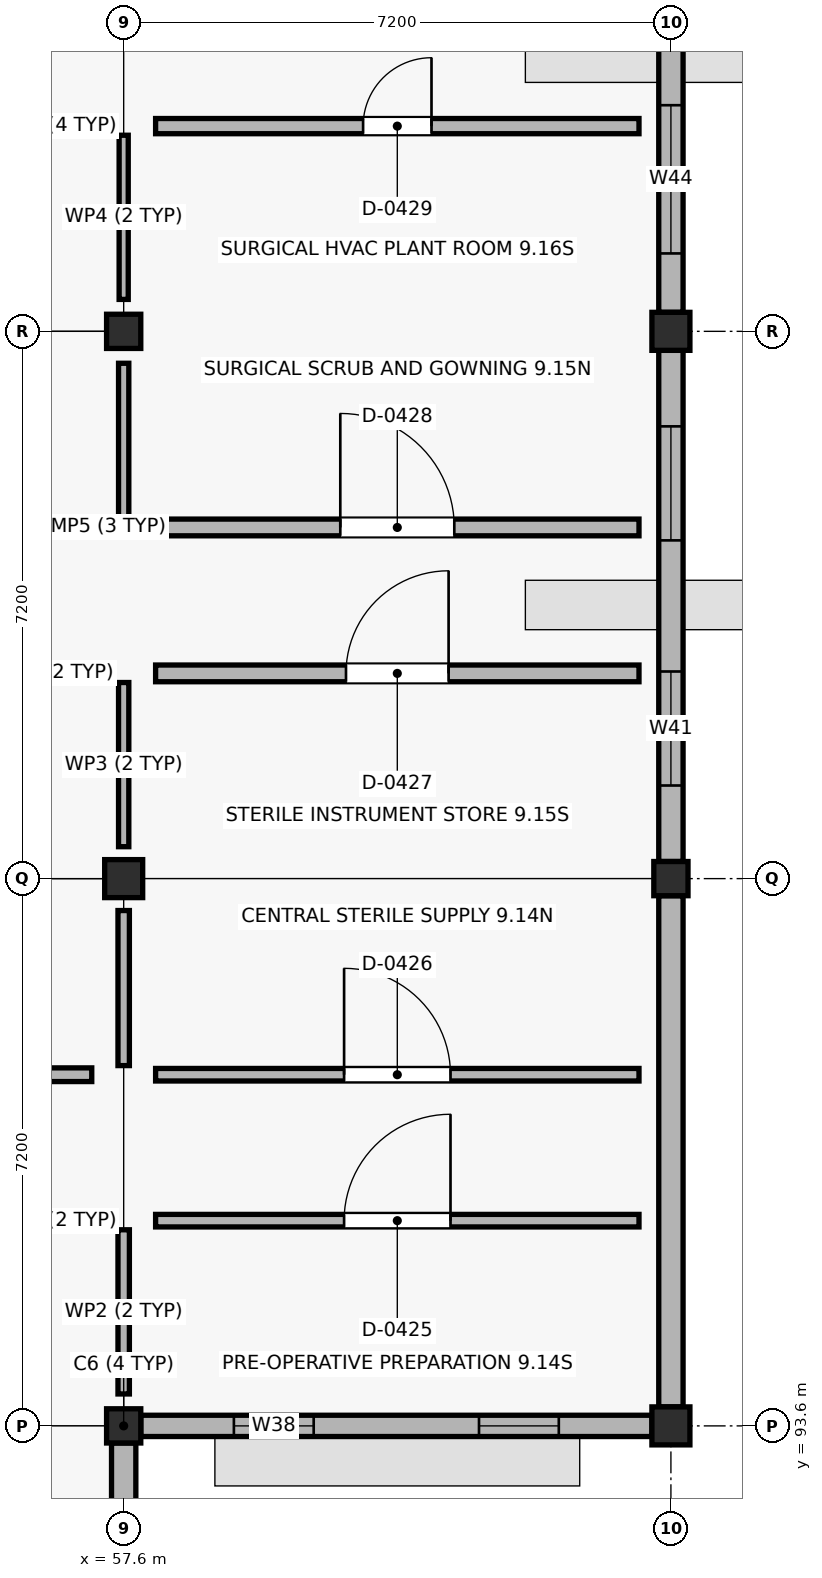
"""IFC4 building model, lengths in metres.
Left out: names, types, materials, properties, quantities, classifications, styles, units other than length and angle.
Written with IfcOpenShell. Run it as: python <this file> out.ifc"""

import sys

from ifc_helpers import new_model, si_unit, direction, frame, frame_2d, origin, origin_2d, place, context, subcontext, project, spatial, rectangle, extrude, element, fill, save


model = new_model("IFC4")
c1 = context("Model", 3, precision=1e-05, world=origin(), true_north=direction((0.0, 1.0)))
c2 = subcontext(c1, "Body", "Model", "MODEL_VIEW")
j1 = project(units=[si_unit("LENGTHUNIT", "METRE"), si_unit("PLANEANGLEUNIT", "RADIAN")], contexts=[c1])
p1 = place(None, origin())
s1 = spatial("IfcSite", under=j1, at=p1, CompositionType="ELEMENT")
p2 = place(p1, origin())
s2 = spatial("IfcBuilding", under=s1, at=p2, CompositionType="ELEMENT")
p3 = place(p2, frame((0.0, 0.0, 9.0)))
s3 = spatial("IfcBuildingStorey", under=s2, at=p3, CompositionType="ELEMENT", Elevation=9.0)
p4 = place(p3, frame((57.6, 93.6, 0.0), z_axis=(0.0, 0.0, 1.0), x_axis=(1.0, 0.0, 0.0)))
e1 = element("IfcColumn", 1, at=p4, inside=s3, PredefinedType="COLUMN", context=c2, shape_type="SweptSolid", body=[
    extrude(rectangle(XDim=0.45, YDim=0.45, at=origin_2d()), origin(), (0.0, 0.0, 1.0), 4.28),
])
p5 = place(p3, frame((57.6, 100.8, 0.0), z_axis=(0.0, 0.0, 1.0), x_axis=(1.0, 0.0, 0.0)))
e2 = element("IfcColumn", 2, at=p5, inside=s3, PredefinedType="COLUMN", context=c2, shape_type="SweptSolid", body=[
    extrude(rectangle(XDim=0.5, YDim=0.5, at=origin_2d()), origin(), (0.0, 0.0, 1.0), 4.28),
])
p6 = place(p3, frame((57.6, 108.0, 0.0), z_axis=(0.0, 0.0, 1.0), x_axis=(1.0, 0.0, 0.0)))
e3 = element("IfcColumn", 3, at=p6, inside=s3, PredefinedType="COLUMN", context=c2, shape_type="SweptSolid", body=[
    extrude(rectangle(XDim=0.45, YDim=0.45, at=origin_2d()), origin(), (0.0, 0.0, 1.0), 4.28),
])
p7 = place(p3, frame((64.8, 93.6, 0.0), z_axis=(0.0, 0.0, 1.0), x_axis=(1.0, 0.0, 0.0)))
e4 = element("IfcColumn", 4, at=p7, inside=s3, PredefinedType="COLUMN", context=c2, shape_type="SweptSolid", body=[
    extrude(rectangle(XDim=0.5, YDim=0.5, at=origin_2d()), origin(), (0.0, 0.0, 1.0), 4.28),
])
p8 = place(p3, frame((64.8, 100.8, 0.0), z_axis=(0.0, 0.0, 1.0), x_axis=(1.0, 0.0, 0.0)))
e5 = element("IfcColumn", 5, at=p8, inside=s3, PredefinedType="COLUMN", context=c2, shape_type="SweptSolid", body=[
    extrude(rectangle(XDim=0.45, YDim=0.45, at=origin_2d()), origin(), (0.0, 0.0, 1.0), 4.28),
])
p9 = place(p3, frame((64.8, 108.0, 0.0), z_axis=(0.0, 0.0, 1.0), x_axis=(1.0, 0.0, 0.0)))
e6 = element("IfcColumn", 6, at=p9, inside=s3, PredefinedType="COLUMN", context=c2, shape_type="SweptSolid", body=[
    extrude(rectangle(XDim=0.5, YDim=0.5, at=origin_2d()), origin(), (0.0, 0.0, 1.0), 4.28),
])
p10 = place(p3, frame((57.6, 86.65, 0.0), z_axis=(0.0, 0.0, 1.0), x_axis=(0.0, 1.0, 0.0)))
e7 = element("IfcWall", 7, at=p10, inside=s3, PredefinedType="STANDARD", context=c2, shape_type="SweptSolid", body=[
    extrude(rectangle(XDim=6.725, YDim=0.32, at=frame_2d((3.363, 0.0))), origin(), (0.0, 0.0, 1.0), 3.69),
])
p11 = place(p10, frame((1.15, 0.0, 0.9)))
e8 = element("IfcOpeningElement", 8, at=p11, cuts=e7, PredefinedType="OPENING", context=c2, shape_type="SweptSolid", body=[
    extrude(rectangle(XDim=1.2, YDim=1.62, at=frame_2d((0.6, 0.81))), frame((0.0, 0.17, 0.0), z_axis=(0.0, -1.0, 0.0), x_axis=(1.0, 0.0, 0.0)), (0.0, 0.0, 1.0), 0.34),
])
p12 = place(p10, frame((4.375, 0.0, 0.9)))
e9 = element("IfcOpeningElement", 9, at=p12, cuts=e7, PredefinedType="OPENING", context=c2, shape_type="SweptSolid", body=[
    extrude(rectangle(XDim=1.2, YDim=1.62, at=frame_2d((0.6, 0.81))), frame((0.0, 0.17, 0.0), z_axis=(0.0, -1.0, 0.0), x_axis=(1.0, 0.0, 0.0)), (0.0, 0.0, 1.0), 0.34),
])
p13 = place(p3, frame((57.825, 93.6, 0.0), z_axis=(0.0, 0.0, 1.0), x_axis=(1.0, 0.0, 0.0)))
e10 = element("IfcWall", 10, at=p13, inside=s3, PredefinedType="STANDARD", context=c2, shape_type="SweptSolid", body=[
    extrude(rectangle(XDim=6.725, YDim=0.28, at=frame_2d((3.363, 0.0))), origin(), (0.0, 0.0, 1.0), 3.59),
])
p14 = place(p13, frame((1.225, 0.0, 0.9)))
e11 = element("IfcOpeningElement", 11, at=p14, cuts=e10, PredefinedType="OPENING", context=c2, shape_type="SweptSolid", body=[
    extrude(rectangle(XDim=1.05, YDim=1.75, at=frame_2d((0.525, 0.875))), frame((0.0, 0.15, 0.0), z_axis=(0.0, -1.0, 0.0), x_axis=(1.0, 0.0, 0.0)), (0.0, 0.0, 1.0), 0.3),
])
p15 = place(p13, frame((4.45, 0.0, 0.9)))
e12 = element("IfcOpeningElement", 12, at=p15, cuts=e10, PredefinedType="OPENING", context=c2, shape_type="SweptSolid", body=[
    extrude(rectangle(XDim=1.05, YDim=1.75, at=frame_2d((0.525, 0.875))), frame((0.0, 0.15, 0.0), z_axis=(0.0, -1.0, 0.0), x_axis=(1.0, 0.0, 0.0)), (0.0, 0.0, 1.0), 0.3),
])
p16 = place(p3, frame((64.8, 93.85, 0.0), z_axis=(0.0, 0.0, 1.0), x_axis=(0.0, 1.0, 0.0)))
e13 = element("IfcWall", 13, at=p16, inside=s3, PredefinedType="STANDARD", context=c2, shape_type="SweptSolid", body=[
    extrude(rectangle(XDim=6.725, YDim=0.32, at=frame_2d((3.362, 0.0))), origin(), (0.0, 0.0, 1.0), 3.69),
])
p17 = place(p3, frame((64.8, 101.025, 0.0), z_axis=(0.0, 0.0, 1.0), x_axis=(0.0, 1.0, 0.0)))
e14 = element("IfcWall", 14, at=p17, inside=s3, PredefinedType="STANDARD", context=c2, shape_type="SweptSolid", body=[
    extrude(rectangle(XDim=6.725, YDim=0.32, at=frame_2d((3.363, 0.0))), origin(), (0.0, 0.0, 1.0), 3.69),
])
p18 = place(p17, frame((1.0, 0.0, 0.9)))
e15 = element("IfcOpeningElement", 15, at=p18, cuts=e14, PredefinedType="OPENING", context=c2, shape_type="SweptSolid", body=[
    extrude(rectangle(XDim=1.5, YDim=1.75, at=frame_2d((0.75, 0.875))), frame((0.0, 0.17, 0.0), z_axis=(0.0, -1.0, 0.0), x_axis=(1.0, 0.0, 0.0)), (0.0, 0.0, 1.0), 0.34),
])
p19 = place(p17, frame((4.225, 0.0, 0.9)))
e16 = element("IfcOpeningElement", 16, at=p19, cuts=e14, PredefinedType="OPENING", context=c2, shape_type="SweptSolid", body=[
    extrude(rectangle(XDim=1.5, YDim=1.75, at=frame_2d((0.75, 0.875))), frame((0.0, 0.17, 0.0), z_axis=(0.0, -1.0, 0.0), x_axis=(1.0, 0.0, 0.0)), (0.0, 0.0, 1.0), 0.34),
])
p20 = place(p3, frame((64.8, 108.25, 0.0), z_axis=(0.0, 0.0, 1.0), x_axis=(0.0, 1.0, 0.0)))
e17 = element("IfcWall", 17, at=p20, inside=s3, PredefinedType="STANDARD", context=c2, shape_type="SweptSolid", body=[
    extrude(rectangle(XDim=6.725, YDim=0.32, at=frame_2d((3.363, 0.0))), origin(), (0.0, 0.0, 1.0), 3.69),
])
p21 = place(p20, frame((0.775, 0.0, 0.9)))
e18 = element("IfcOpeningElement", 18, at=p21, cuts=e17, PredefinedType="OPENING", context=c2, shape_type="SweptSolid", body=[
    extrude(rectangle(XDim=1.95, YDim=1.75, at=frame_2d((0.975, 0.875))), frame((0.0, 0.17, 0.0), z_axis=(0.0, -1.0, 0.0), x_axis=(1.0, 0.0, 0.0)), (0.0, 0.0, 1.0), 0.34),
])
p22 = place(p20, frame((4.0, 0.0, 0.9)))
e19 = element("IfcOpeningElement", 19, at=p22, cuts=e17, PredefinedType="OPENING", context=c2, shape_type="SweptSolid", body=[
    extrude(rectangle(XDim=1.95, YDim=1.75, at=frame_2d((0.975, 0.875))), frame((0.0, 0.17, 0.0), z_axis=(0.0, -1.0, 0.0), x_axis=(1.0, 0.0, 0.0)), (0.0, 0.0, 1.0), 0.34),
])
p23 = place(p3, frame((50.82, 96.3, 0.0), z_axis=(0.0, 0.0, 1.0), x_axis=(1.0, 0.0, 0.0)))
e20 = element("IfcWall", 20, at=p23, inside=s3, PredefinedType="PARTITIONING", context=c2, shape_type="SweptSolid", body=[
    extrude(rectangle(XDim=6.36, YDim=0.18, at=frame_2d((3.18, 0.0))), origin(), (0.0, 0.0, 1.0), 3.38),
])
p24 = place(p23, frame((2.43, 0.0, 0.0)))
e21 = element("IfcOpeningElement", 21, at=p24, cuts=e20, PredefinedType="OPENING", context=c2, shape_type="SweptSolid", body=[
    extrude(rectangle(XDim=1.5, YDim=2.2, at=frame_2d((0.75, 1.1))), frame((0.0, 0.1, 0.0), z_axis=(0.0, -1.0, 0.0), x_axis=(1.0, 0.0, 0.0)), (0.0, 0.0, 1.0), 0.2),
])
p25 = place(p3, frame((57.6, 94.02, 0.0), z_axis=(0.0, 0.0, 1.0), x_axis=(0.0, 1.0, 0.0)))
e22 = element("IfcWall", 22, at=p25, inside=s3, PredefinedType="PARTITIONING", context=c2, shape_type="SweptSolid", body=[
    extrude(rectangle(XDim=2.16, YDim=0.15, at=frame_2d((1.08, 0.0))), origin(), (0.0, 0.0, 1.0), 3.38),
])
p26 = place(p3, frame((50.82, 98.22, 0.0), z_axis=(0.0, 0.0, 1.0), x_axis=(1.0, 0.0, 0.0)))
e23 = element("IfcWall", 23, at=p26, inside=s3, PredefinedType="PARTITIONING", context=c2, shape_type="SweptSolid", body=[
    extrude(rectangle(XDim=6.36, YDim=0.18, at=frame_2d((3.18, 0.0))), origin(), (0.0, 0.0, 1.0), 3.38),
])
p27 = place(p26, frame((2.49, 0.0, 0.0)))
e24 = element("IfcOpeningElement", 24, at=p27, cuts=e23, PredefinedType="OPENING", context=c2, shape_type="SweptSolid", body=[
    extrude(rectangle(XDim=1.38, YDim=2.19, at=frame_2d((0.69, 1.095))), frame((0.0, 0.1, 0.0), z_axis=(0.0, -1.0, 0.0), x_axis=(1.0, 0.0, 0.0)), (0.0, 0.0, 1.0), 0.2),
])
p28 = place(p3, frame((57.6, 98.34, 0.0), z_axis=(0.0, 0.0, 1.0), x_axis=(0.0, 1.0, 0.0)))
e25 = element("IfcWall", 25, at=p28, inside=s3, PredefinedType="PARTITIONING", context=c2, shape_type="SweptSolid", body=[
    extrude(rectangle(XDim=2.04, YDim=0.15, at=frame_2d((1.02, 0.0))), origin(), (0.0, 0.0, 1.0), 3.38),
])
p29 = place(p3, frame((50.82, 103.5, 0.0), z_axis=(0.0, 0.0, 1.0), x_axis=(1.0, 0.0, 0.0)))
e26 = element("IfcWall", 26, at=p29, inside=s3, PredefinedType="PLUMBINGWALL", context=c2, shape_type="SweptSolid", body=[
    extrude(rectangle(XDim=6.36, YDim=0.21, at=frame_2d((3.18, 0.0))), origin(), (0.0, 0.0, 1.0), 3.38),
])
p30 = place(p29, frame((2.47, 0.0, 0.0)))
e27 = element("IfcOpeningElement", 27, at=p30, cuts=e26, PredefinedType="OPENING", context=c2, shape_type="SweptSolid", body=[
    extrude(rectangle(XDim=1.42, YDim=2.19, at=frame_2d((0.71, 1.095))), frame((0.0, 0.115, 0.0), z_axis=(0.0, -1.0, 0.0), x_axis=(1.0, 0.0, 0.0)), (0.0, 0.0, 1.0), 0.23),
])
p31 = place(p3, frame((57.6, 101.22, 0.0), z_axis=(0.0, 0.0, 1.0), x_axis=(0.0, 1.0, 0.0)))
e28 = element("IfcWall", 28, at=p31, inside=s3, PredefinedType="PARTITIONING", context=c2, shape_type="SweptSolid", body=[
    extrude(rectangle(XDim=2.16, YDim=0.135, at=frame_2d((1.08, 0.0))), origin(), (0.0, 0.0, 1.0), 3.38),
])
p32 = place(p3, frame((50.82, 105.42, 0.0), z_axis=(0.0, 0.0, 1.0), x_axis=(1.0, 0.0, 0.0)))
e29 = element("IfcWall", 29, at=p32, inside=s3, PredefinedType="PARTITIONING", context=c2, shape_type="SweptSolid", body=[
    extrude(rectangle(XDim=6.36, YDim=0.165, at=frame_2d((3.18, 0.0))), origin(), (0.0, 0.0, 1.0), 3.38),
])
p33 = place(p32, frame((2.43, 0.0, 0.0)))
e30 = element("IfcOpeningElement", 30, at=p33, cuts=e29, PredefinedType="OPENING", context=c2, shape_type="SweptSolid", body=[
    extrude(rectangle(XDim=1.5, YDim=2.2, at=frame_2d((0.75, 1.1))), frame((0.0, 0.093, 0.0), z_axis=(0.0, -1.0, 0.0), x_axis=(1.0, 0.0, 0.0)), (0.0, 0.0, 1.0), 0.185),
])
p34 = place(p3, frame((57.6, 105.54, 0.0), z_axis=(0.0, 0.0, 1.0), x_axis=(0.0, 1.0, 0.0)))
e31 = element("IfcWall", 31, at=p34, inside=s3, PredefinedType="PARTITIONING", context=c2, shape_type="SweptSolid", body=[
    extrude(rectangle(XDim=2.04, YDim=0.135, at=frame_2d((1.02, 0.0))), origin(), (0.0, 0.0, 1.0), 3.38),
])
p35 = place(p3, frame((50.82, 110.7, 0.0), z_axis=(0.0, 0.0, 1.0), x_axis=(1.0, 0.0, 0.0)))
e32 = element("IfcWall", 32, at=p35, inside=s3, PredefinedType="SOLIDWALL", context=c2, shape_type="SweptSolid", body=[
    extrude(rectangle(XDim=6.36, YDim=0.22, at=frame_2d((3.18, 0.0))), origin(), (0.0, 0.0, 1.0), 3.38),
])
p36 = place(p35, frame((2.43, 0.0, 0.0)))
e33 = element("IfcOpeningElement", 33, at=p36, cuts=e32, PredefinedType="OPENING", context=c2, shape_type="SweptSolid", body=[
    extrude(rectangle(XDim=1.5, YDim=2.2, at=frame_2d((0.75, 1.1))), frame((0.0, 0.12, 0.0), z_axis=(0.0, -1.0, 0.0), x_axis=(1.0, 0.0, 0.0)), (0.0, 0.0, 1.0), 0.24),
])
p37 = place(p3, frame((57.6, 108.42, 0.0), z_axis=(0.0, 0.0, 1.0), x_axis=(0.0, 1.0, 0.0)))
e34 = element("IfcWall", 34, at=p37, inside=s3, PredefinedType="PARTITIONING", context=c2, shape_type="SweptSolid", body=[
    extrude(rectangle(XDim=2.16, YDim=0.12, at=frame_2d((1.08, 0.0))), origin(), (0.0, 0.0, 1.0), 3.38),
])
p38 = place(p3, frame((58.02, 96.3, 0.0), z_axis=(0.0, 0.0, 1.0), x_axis=(1.0, 0.0, 0.0)))
e35 = element("IfcWall", 35, at=p38, inside=s3, PredefinedType="PARTITIONING", context=c2, shape_type="SweptSolid", body=[
    extrude(rectangle(XDim=6.36, YDim=0.165, at=frame_2d((3.18, 0.0))), origin(), (0.0, 0.0, 1.0), 3.38),
])
p39 = place(p38, frame((2.48, 0.0, 0.0)))
e36 = element("IfcOpeningElement", 36, at=p39, cuts=e35, PredefinedType="OPENING", context=c2, shape_type="SweptSolid", body=[
    extrude(rectangle(XDim=1.4, YDim=2.2, at=frame_2d((0.7, 1.1))), frame((0.0, 0.093, 0.0), z_axis=(0.0, -1.0, 0.0), x_axis=(1.0, 0.0, 0.0)), (0.0, 0.0, 1.0), 0.185),
])
p40 = place(p3, frame((58.02, 98.22, 0.0), z_axis=(0.0, 0.0, 1.0), x_axis=(1.0, 0.0, 0.0)))
e37 = element("IfcWall", 37, at=p40, inside=s3, PredefinedType="PARTITIONING", context=c2, shape_type="SweptSolid", body=[
    extrude(rectangle(XDim=6.36, YDim=0.165, at=frame_2d((3.18, 0.0))), origin(), (0.0, 0.0, 1.0), 3.38),
])
p41 = place(p40, frame((2.48, 0.0, 0.0)))
e38 = element("IfcOpeningElement", 38, at=p41, cuts=e37, PredefinedType="OPENING", context=c2, shape_type="SweptSolid", body=[
    extrude(rectangle(XDim=1.4, YDim=2.2, at=frame_2d((0.7, 1.1))), frame((0.0, 0.093, 0.0), z_axis=(0.0, -1.0, 0.0), x_axis=(1.0, 0.0, 0.0)), (0.0, 0.0, 1.0), 0.185),
])
p42 = place(p3, frame((58.02, 103.5, 0.0), z_axis=(0.0, 0.0, 1.0), x_axis=(1.0, 0.0, 0.0)))
e39 = element("IfcWall", 39, at=p42, inside=s3, PredefinedType="SOLIDWALL", context=c2, shape_type="SweptSolid", body=[
    extrude(rectangle(XDim=6.36, YDim=0.22, at=frame_2d((3.18, 0.0))), origin(), (0.0, 0.0, 1.0), 3.38),
])
p43 = place(p42, frame((2.505, 0.0, 0.0)))
e40 = element("IfcOpeningElement", 40, at=p43, cuts=e39, PredefinedType="OPENING", context=c2, shape_type="SweptSolid", body=[
    extrude(rectangle(XDim=1.35, YDim=2.2, at=frame_2d((0.675, 1.1))), frame((0.0, 0.12, 0.0), z_axis=(0.0, -1.0, 0.0), x_axis=(1.0, 0.0, 0.0)), (0.0, 0.0, 1.0), 0.24),
])
p44 = place(p3, frame((58.02, 105.42, 0.0), z_axis=(0.0, 0.0, 1.0), x_axis=(1.0, 0.0, 0.0)))
e41 = element("IfcWall", 41, at=p44, inside=s3, PredefinedType="SOLIDWALL", context=c2, shape_type="SweptSolid", body=[
    extrude(rectangle(XDim=6.36, YDim=0.22, at=frame_2d((3.18, 0.0))), origin(), (0.0, 0.0, 1.0), 3.38),
])
p45 = place(p44, frame((2.43, 0.0, 0.0)))
e42 = element("IfcOpeningElement", 42, at=p45, cuts=e41, PredefinedType="OPENING", context=c2, shape_type="SweptSolid", body=[
    extrude(rectangle(XDim=1.5, YDim=2.2, at=frame_2d((0.75, 1.1))), frame((0.0, 0.12, 0.0), z_axis=(0.0, -1.0, 0.0), x_axis=(1.0, 0.0, 0.0)), (0.0, 0.0, 1.0), 0.24),
])
p46 = place(p3, frame((58.02, 110.7, 0.0), z_axis=(0.0, 0.0, 1.0), x_axis=(1.0, 0.0, 0.0)))
e43 = element("IfcWall", 43, at=p46, inside=s3, PredefinedType="SOLIDWALL", context=c2, shape_type="SweptSolid", body=[
    extrude(rectangle(XDim=6.36, YDim=0.2, at=frame_2d((3.18, 0.0))), origin(), (0.0, 0.0, 1.0), 3.38),
])
p47 = place(p46, frame((2.73, 0.0, 0.0)))
e44 = element("IfcOpeningElement", 44, at=p47, cuts=e43, PredefinedType="OPENING", context=c2, shape_type="SweptSolid", body=[
    extrude(rectangle(XDim=0.9, YDim=2.04, at=frame_2d((0.45, 1.02))), frame((0.0, 0.11, 0.0), z_axis=(0.0, -1.0, 0.0), x_axis=(1.0, 0.0, 0.0)), (0.0, 0.0, 1.0), 0.22),
])
p48 = place(p14, origin())
e45 = element("IfcWindow", 45, at=p48, inside=s3, PartitioningType="SINGLE_PANEL", PredefinedType="WINDOW", context=c2, shape_type="SweptSolid", body=[
    extrude(rectangle(XDim=1.05, YDim=1.75, at=frame_2d((0.525, 0.875))), frame((0.0, 0.03, 0.0), z_axis=(0.0, -1.0, 0.0), x_axis=(1.0, 0.0, 0.0)), (0.0, 0.0, 1.0), 0.06),
])
fill(e11, e45)
p49 = place(p15, origin())
e46 = element("IfcWindow", 46, at=p49, inside=s3, PartitioningType="SINGLE_PANEL", PredefinedType="WINDOW", context=c2, shape_type="SweptSolid", body=[
    extrude(rectangle(XDim=1.05, YDim=1.75, at=frame_2d((0.525, 0.875))), frame((0.0, 0.03, 0.0), z_axis=(0.0, -1.0, 0.0), x_axis=(1.0, 0.0, 0.0)), (0.0, 0.0, 1.0), 0.06),
])
fill(e12, e46)
p50 = place(p18, origin())
e47 = element("IfcWindow", 47, at=p50, inside=s3, PartitioningType="SINGLE_PANEL", PredefinedType="WINDOW", context=c2, shape_type="SweptSolid", body=[
    extrude(rectangle(XDim=1.5, YDim=1.75, at=frame_2d((0.75, 0.875))), frame((0.0, 0.03, 0.0), z_axis=(0.0, -1.0, 0.0), x_axis=(1.0, 0.0, 0.0)), (0.0, 0.0, 1.0), 0.06),
])
fill(e15, e47)
p51 = place(p19, origin())
e48 = element("IfcWindow", 48, at=p51, inside=s3, PartitioningType="SINGLE_PANEL", PredefinedType="WINDOW", context=c2, shape_type="SweptSolid", body=[
    extrude(rectangle(XDim=1.5, YDim=1.75, at=frame_2d((0.75, 0.875))), frame((0.0, 0.03, 0.0), z_axis=(0.0, -1.0, 0.0), x_axis=(1.0, 0.0, 0.0)), (0.0, 0.0, 1.0), 0.06),
])
fill(e16, e48)
p52 = place(p21, origin())
e49 = element("IfcWindow", 49, at=p52, inside=s3, PartitioningType="SINGLE_PANEL", PredefinedType="WINDOW", context=c2, shape_type="SweptSolid", body=[
    extrude(rectangle(XDim=1.95, YDim=1.75, at=frame_2d((0.975, 0.875))), frame((0.0, 0.03, 0.0), z_axis=(0.0, -1.0, 0.0), x_axis=(1.0, 0.0, 0.0)), (0.0, 0.0, 1.0), 0.06),
])
fill(e18, e49)
p53 = place(p39, origin())
e50 = element("IfcDoor", 50, at=p53, inside=s3, OperationType="SINGLE_SWING_RIGHT", PredefinedType="DOOR", context=c2, shape_type="SweptSolid", body=[
    extrude(rectangle(XDim=1.4, YDim=2.2, at=frame_2d((0.7, 1.1))), frame((0.0, 0.025, 0.0), z_axis=(0.0, -1.0, 0.0), x_axis=(1.0, 0.0, 0.0)), (0.0, 0.0, 1.0), 0.05),
])
fill(e36, e50)
p54 = place(p41, origin())
e51 = element("IfcDoor", 51, at=p54, inside=s3, OperationType="SINGLE_SWING_LEFT", PredefinedType="DOOR", context=c2, shape_type="SweptSolid", body=[
    extrude(rectangle(XDim=1.4, YDim=2.2, at=frame_2d((0.7, 1.1))), frame((0.0, 0.025, 0.0), z_axis=(0.0, -1.0, 0.0), x_axis=(1.0, 0.0, 0.0)), (0.0, 0.0, 1.0), 0.05),
])
fill(e38, e51)
p55 = place(p43, origin())
e52 = element("IfcDoor", 52, at=p55, inside=s3, OperationType="SINGLE_SWING_RIGHT", PredefinedType="DOOR", context=c2, shape_type="SweptSolid", body=[
    extrude(rectangle(XDim=1.35, YDim=2.2, at=frame_2d((0.675, 1.1))), frame((0.0, 0.025, 0.0), z_axis=(0.0, -1.0, 0.0), x_axis=(1.0, 0.0, 0.0)), (0.0, 0.0, 1.0), 0.05),
])
fill(e40, e52)
p56 = place(p45, origin())
e53 = element("IfcDoor", 53, at=p56, inside=s3, OperationType="SINGLE_SWING_LEFT", PredefinedType="DOOR", context=c2, shape_type="SweptSolid", body=[
    extrude(rectangle(XDim=1.5, YDim=2.2, at=frame_2d((0.75, 1.1))), frame((0.0, 0.025, 0.0), z_axis=(0.0, -1.0, 0.0), x_axis=(1.0, 0.0, 0.0)), (0.0, 0.0, 1.0), 0.05),
])
fill(e42, e53)
p57 = place(p47, origin())
e54 = element("IfcDoor", 54, at=p57, inside=s3, OperationType="SINGLE_SWING_RIGHT", PredefinedType="DOOR", context=c2, shape_type="SweptSolid", body=[
    extrude(rectangle(XDim=0.9, YDim=2.04, at=frame_2d((0.45, 1.02))), frame((0.0, 0.025, 0.0), z_axis=(0.0, -1.0, 0.0), x_axis=(1.0, 0.0, 0.0)), (0.0, 0.0, 1.0), 0.05),
])
fill(e44, e54)
save(model, sys.argv[1])
